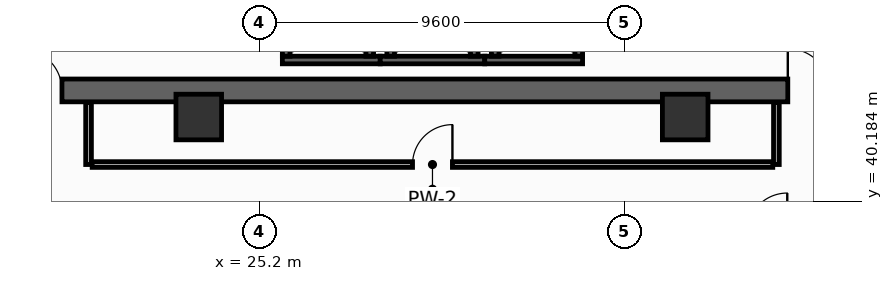
"""IFC4 building model, lengths in metres.
Left out: names, types, materials, properties, quantities, classifications, styles, units other than length and angle.
Written with IfcOpenShell. Run it as: python <this file> out.ifc"""

import sys

from ifc_helpers import new_model, si_unit, direction, frame, frame_2d, origin, origin_2d, place, context, subcontext, project, spatial, rectangle, hollow_rectangle, extrude, element, fill, save


model = new_model("IFC4")
c1 = context("Model", 3, precision=1e-05, world=origin(), true_north=direction((0.0, 1.0)))
c2 = subcontext(c1, "Body", "Model", "MODEL_VIEW")
j1 = project(units=[si_unit("LENGTHUNIT", "METRE"), si_unit("PLANEANGLEUNIT", "RADIAN")], contexts=[c1])
p1 = place(None, origin())
s1 = spatial("IfcSite", under=j1, at=p1, CompositionType="ELEMENT")
p2 = place(p1, origin())
s2 = spatial("IfcBuilding", under=s1, at=p2, CompositionType="ELEMENT")
p3 = place(p2, frame((0.0, 0.0, 64.8)))
s3 = spatial("IfcBuildingStorey", under=s2, at=p3, CompositionType="ELEMENT", Elevation=64.8)
p4 = place(p3, frame((13.5, 43.1, 0.0), z_axis=(0.0, 0.0, 1.0), x_axis=(1.0, 0.0, 0.0)))
e1 = element("IfcWall", 1, at=p4, inside=s3, PredefinedType="SHEAR", context=c2, shape_type="SweptSolid", body=[
    extrude(rectangle(XDim=32.9, YDim=0.6, at=frame_2d((16.45, 0.0))), origin(), (0.0, 0.0, 1.0), 4.15),
])
p5 = place(p4, frame((5.4, 0.0, 0.0)))
e2 = element("IfcOpeningElement", 2, at=p5, cuts=e1, PredefinedType="OPENING", context=c2, shape_type="SweptSolid", body=[
    extrude(rectangle(XDim=1.1, YDim=2.15, at=frame_2d((0.55, 1.075))), frame((0.0, 0.31, 0.0), z_axis=(0.0, -1.0, 0.0), x_axis=(1.0, 0.0, 0.0)), (0.0, 0.0, 1.0), 0.62),
])
p6 = place(p4, frame((25.6, 0.0, 0.0)))
e3 = element("IfcOpeningElement", 3, at=p6, cuts=e1, PredefinedType="OPENING", context=c2, shape_type="SweptSolid", body=[
    extrude(rectangle(XDim=1.1, YDim=2.15, at=frame_2d((0.55, 1.075))), frame((0.0, 0.31, 0.0), z_axis=(0.0, -1.0, 0.0), x_axis=(1.0, 0.0, 0.0)), (0.0, 0.0, 1.0), 0.62),
])
for number, where, z_axis, x_axis in (
    (4, (23.6, 42.4, 0.0), (0.0, 0.0, 1.0), (1.0, 0.0, 0.0)),
    (5, (36.4, 42.4, 0.0), (0.0, 0.0, 1.0), (1.0, 0.0, 0.0)),
):
    element("IfcColumn", number, at=place(p3, frame(where, z_axis=z_axis, x_axis=x_axis)), inside=s3, PredefinedType="COLUMN", context=c2, shape_type="SweptSolid", body=[
        extrude(hollow_rectangle(XDim=1.2, YDim=1.2, WallThickness=0.055, at=origin_2d()), origin(), (0.0, 0.0, 1.0), 4.4),
    ])
p7 = place(p3, frame((25.8, 43.9, 0.0), z_axis=(0.0, 0.0, 1.0), x_axis=(1.0, 0.0, 0.0)))
e6 = element("IfcWall", 6, at=p7, inside=s3, PredefinedType="SHEAR", context=c2, shape_type="SweptSolid", body=[
    extrude(rectangle(XDim=2.575, YDim=0.2, at=frame_2d((1.288, 0.0))), origin(), (0.0, 0.0, 1.0), 4.15),
])
for number, where, z_axis, x_axis in (
    (7, (25.9, 44.0, 0.0), (0.0, 0.0, 1.0), (0.0, 1.0, 0.0)),
    (8, (28.1, 44.0, 0.0), (0.0, 0.0, 1.0), (0.0, 1.0, 0.0)),
):
    element("IfcWall", number, at=place(p3, frame(where, z_axis=z_axis, x_axis=x_axis)), inside=s3, PredefinedType="SHEAR", context=c2, shape_type="SweptSolid", body=[
        extrude(rectangle(XDim=2.3, YDim=0.2, at=frame_2d((1.15, 0.0))), origin(), (0.0, 0.0, 1.0), 4.15),
    ])
p8 = place(p3, frame((28.375, 43.9, 0.0), z_axis=(0.0, 0.0, 1.0), x_axis=(1.0, 0.0, 0.0)))
e9 = element("IfcWall", 9, at=p8, inside=s3, PredefinedType="SHEAR", context=c2, shape_type="SweptSolid", body=[
    extrude(rectangle(XDim=2.75, YDim=0.2, at=frame_2d((1.375, 0.0))), origin(), (0.0, 0.0, 1.0), 4.15),
])
for number, where, z_axis, x_axis in (
    (10, (28.65, 44.0, 0.0), (0.0, 0.0, 1.0), (0.0, 1.0, 0.0)),
    (11, (30.85, 44.0, 0.0), (0.0, 0.0, 1.0), (0.0, 1.0, 0.0)),
):
    element("IfcWall", number, at=place(p3, frame(where, z_axis=z_axis, x_axis=x_axis)), inside=s3, PredefinedType="SHEAR", context=c2, shape_type="SweptSolid", body=[
        extrude(rectangle(XDim=2.3, YDim=0.2, at=frame_2d((1.15, 0.0))), origin(), (0.0, 0.0, 1.0), 4.15),
    ])
p9 = place(p3, frame((31.125, 43.9, 0.0), z_axis=(0.0, 0.0, 1.0), x_axis=(1.0, 0.0, 0.0)))
e12 = element("IfcWall", 12, at=p9, inside=s3, PredefinedType="SHEAR", context=c2, shape_type="SweptSolid", body=[
    extrude(rectangle(XDim=2.575, YDim=0.2, at=frame_2d((1.288, 0.0))), origin(), (0.0, 0.0, 1.0), 4.15),
])
for number, where, z_axis, x_axis in (
    (13, (31.4, 44.0, 0.0), (0.0, 0.0, 1.0), (0.0, 1.0, 0.0)),
    (14, (33.6, 44.0, 0.0), (0.0, 0.0, 1.0), (0.0, 1.0, 0.0)),
):
    element("IfcWall", number, at=place(p3, frame(where, z_axis=z_axis, x_axis=x_axis)), inside=s3, PredefinedType="SHEAR", context=c2, shape_type="SweptSolid", body=[
        extrude(rectangle(XDim=2.3, YDim=0.2, at=frame_2d((1.15, 0.0))), origin(), (0.0, 0.0, 1.0), 4.15),
    ])
for number, where, z_axis, x_axis in (
    (15, (20.7, 41.15, 0.0), (0.0, 0.0, 1.0), (0.0, 1.0, 0.0)),
    (16, (38.8, 41.15, 0.0), (0.0, 0.0, 1.0), (0.0, 1.0, 0.0)),
):
    element("IfcWall", number, at=place(p3, frame(where, z_axis=z_axis, x_axis=x_axis)), inside=s3, PredefinedType="PARTITIONING", context=c2, shape_type="SweptSolid", body=[
        extrude(rectangle(XDim=1.63, YDim=0.15, at=frame_2d((0.815, 0.0))), origin(), (0.0, 0.0, 1.0), 4.15),
    ])
p10 = place(p3, frame((20.795, 41.15, 0.0), z_axis=(0.0, 0.0, 1.0), x_axis=(1.0, 0.0, 0.0)))
e17 = element("IfcWall", 17, at=p10, inside=s3, PredefinedType="PARTITIONING", context=c2, shape_type="SweptSolid", body=[
    extrude(rectangle(XDim=17.91, YDim=0.15, at=frame_2d((8.955, 0.0))), origin(), (0.0, 0.0, 1.0), 3.335),
])
p11 = place(p10, frame((8.43, 0.0, 0.0)))
e18 = element("IfcOpeningElement", 18, at=p11, cuts=e17, PredefinedType="OPENING", context=c2, shape_type="SweptSolid", body=[
    extrude(rectangle(XDim=1.05, YDim=2.15, at=frame_2d((0.525, 1.075))), frame((0.0, 0.085, 0.0), z_axis=(0.0, -1.0, 0.0), x_axis=(1.0, 0.0, 0.0)), (0.0, 0.0, 1.0), 0.17),
])
p12 = place(p5, origin())
e19 = element("IfcDoor", 19, at=p12, inside=s3, OperationType="SINGLE_SWING_LEFT", PredefinedType="DOOR", context=c2, shape_type="SweptSolid", body=[
    extrude(rectangle(XDim=1.1, YDim=2.15, at=frame_2d((0.55, 1.075))), frame((0.0, 0.025, 0.0), z_axis=(0.0, -1.0, 0.0), x_axis=(1.0, 0.0, 0.0)), (0.0, 0.0, 1.0), 0.05),
])
fill(e2, e19)
p13 = place(p6, origin())
e20 = element("IfcDoor", 20, at=p13, inside=s3, OperationType="SINGLE_SWING_LEFT", PredefinedType="DOOR", context=c2, shape_type="SweptSolid", body=[
    extrude(rectangle(XDim=1.1, YDim=2.15, at=frame_2d((0.55, 1.075))), frame((0.0, 0.025, 0.0), z_axis=(0.0, -1.0, 0.0), x_axis=(1.0, 0.0, 0.0)), (0.0, 0.0, 1.0), 0.05),
])
fill(e3, e20)
p14 = place(p11, origin())
e21 = element("IfcDoor", 21, at=p14, inside=s3, OperationType="SINGLE_SWING_RIGHT", PredefinedType="DOOR", context=c2, shape_type="SweptSolid", body=[
    extrude(rectangle(XDim=1.05, YDim=2.15, at=frame_2d((0.525, 1.075))), frame((0.0, 0.025, 0.0), z_axis=(0.0, -1.0, 0.0), x_axis=(1.0, 0.0, 0.0)), (0.0, 0.0, 1.0), 0.05),
])
fill(e18, e21)
save(model, sys.argv[1])
